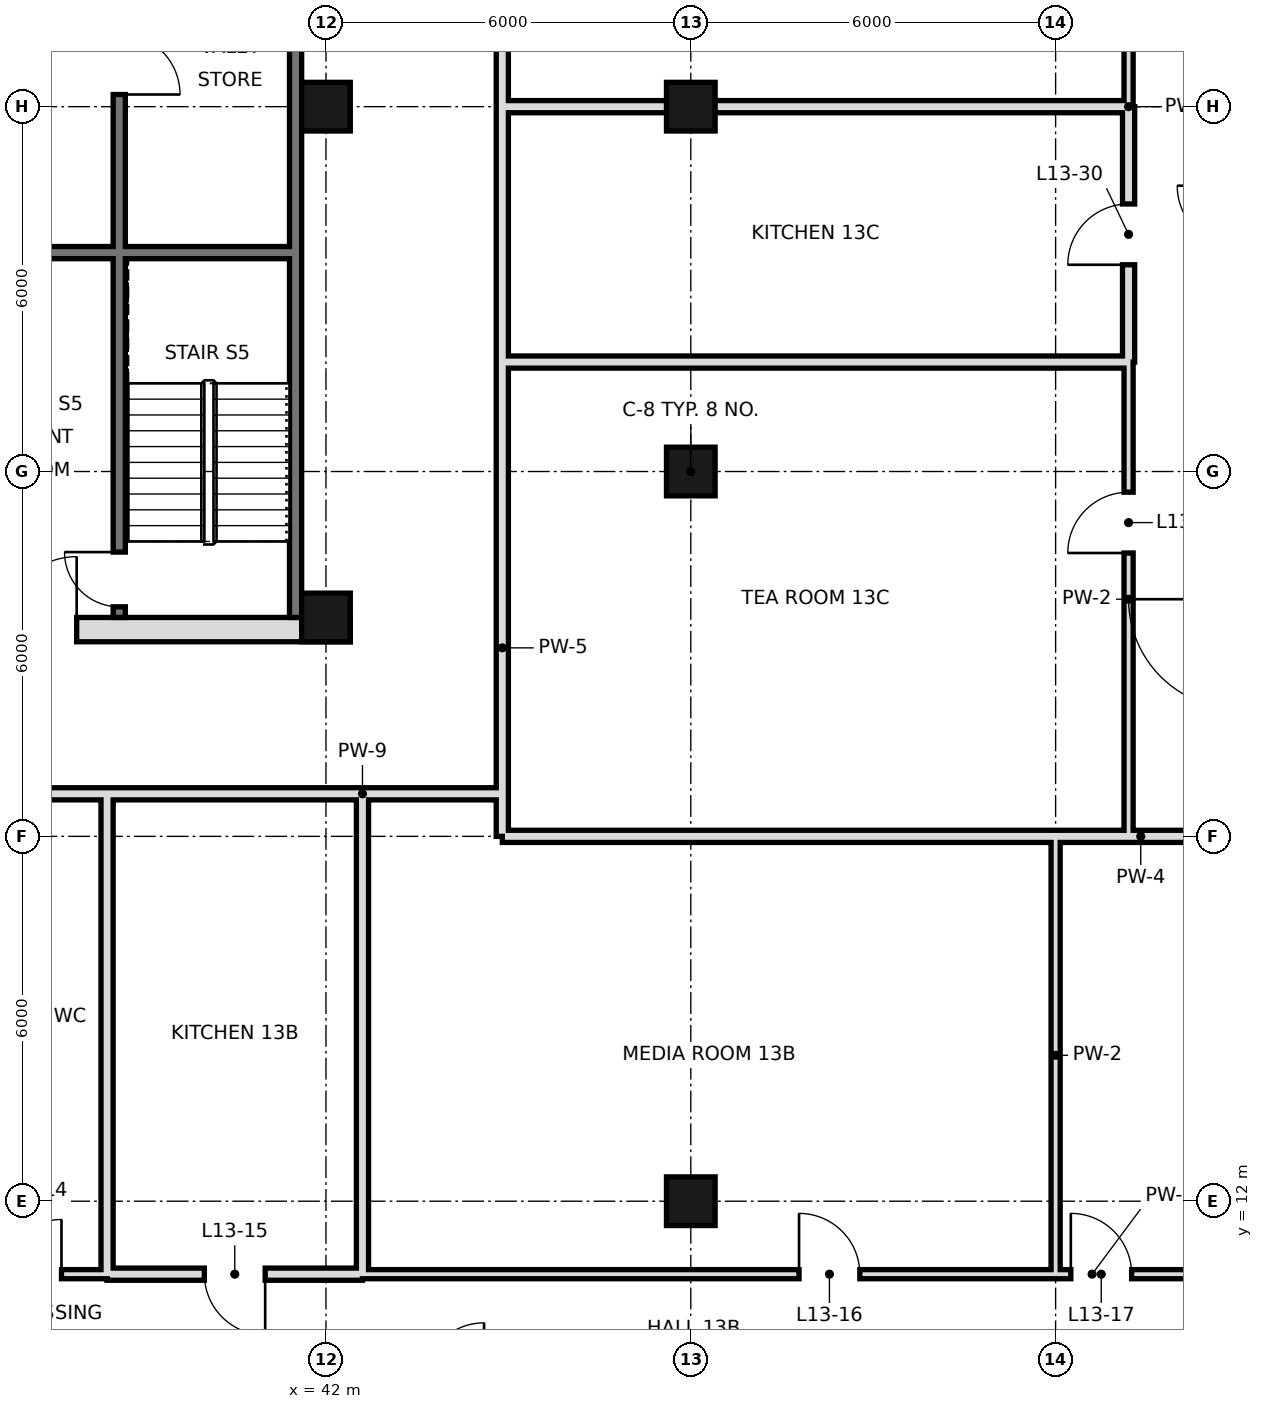
"""IFC4 building model, lengths in metres.
Left out: names, types, materials, properties, quantities, classifications, styles, units other than length and angle.
Written with IfcOpenShell. Run it as: python <this file> out.ifc"""

import sys

from ifc_helpers import new_model, si_unit, direction, frame, frame_2d, origin, origin_2d, place, context, subcontext, project, spatial, rectangle, hollow_rectangle, extrude, element, fill, save


model = new_model("IFC4")
c1 = context("Model", 3, precision=1e-05, world=origin(), true_north=direction((0.0, 1.0)))
c2 = subcontext(c1, "Body", "Model", "MODEL_VIEW")
j1 = project(units=[si_unit("LENGTHUNIT", "METRE"), si_unit("PLANEANGLEUNIT", "RADIAN")], contexts=[c1])
p1 = place(None, origin())
s1 = spatial("IfcSite", under=j1, at=p1, CompositionType="ELEMENT")
p2 = place(p1, origin())
s2 = spatial("IfcBuilding", under=s1, at=p2, CompositionType="ELEMENT")
p3 = place(p2, frame((0.0, 0.0, 67.8)))
s3 = spatial("IfcBuildingStorey", under=s2, at=p3, CompositionType="ELEMENT", Elevation=67.8)
for number, where, z_axis, x_axis in (
    (1, (42.0, 21.6, 0.0), (0.0, 0.0, 1.0), (1.0, 0.0, 0.0)),
    (2, (42.0, 30.0, 0.0), (0.0, 0.0, 1.0), (1.0, 0.0, 0.0)),
):
    element("IfcColumn", number, at=place(p3, frame(where, z_axis=z_axis, x_axis=x_axis)), inside=s3, PredefinedType="COLUMN", context=c2, shape_type="SweptSolid", body=[
        extrude(hollow_rectangle(XDim=0.8, YDim=0.8, WallThickness=0.06, at=origin_2d()), origin(), (0.0, 0.0, 1.0), 3.6),
    ])
for number, where, z_axis, x_axis in (
    (3, (48.0, 12.0, 0.0), (0.0, 0.0, 1.0), (1.0, 0.0, 0.0)),
    (4, (48.0, 24.0, 0.0), (0.0, 0.0, 1.0), (1.0, 0.0, 0.0)),
    (5, (48.0, 30.0, 0.0), (0.0, 0.0, 1.0), (1.0, 0.0, 0.0)),
):
    element("IfcColumn", number, at=place(p3, frame(where, z_axis=z_axis, x_axis=x_axis)), inside=s3, PredefinedType="COLUMN", context=c2, shape_type="SweptSolid", body=[
        extrude(hollow_rectangle(XDim=0.8, YDim=0.8, WallThickness=0.04, at=origin_2d()), origin(), (0.0, 0.0, 1.0), 3.6),
    ])
for number, where, z_axis, x_axis in (
    (6, (38.4, 10.8, 0.0), (0.0, 0.0, 1.0), (0.0, 1.0, 0.0)),
    (7, (42.6, 10.8, 0.0), (0.0, 0.0, 1.0), (0.0, 1.0, 0.0)),
):
    element("IfcWall", number, at=place(p3, frame(where, z_axis=z_axis, x_axis=x_axis)), inside=s3, PredefinedType="SOLIDWALL", context=c2, shape_type="SweptSolid", body=[
        extrude(rectangle(XDim=7.9, YDim=0.2, at=frame_2d((3.95, 0.0))), origin(), (0.0, 0.0, 1.0), 2.72),
    ])
p4 = place(p3, frame((44.9, 18.7, 0.0), z_axis=(0.0, 0.0, 1.0), x_axis=(0.0, 1.0, 0.0)))
e8 = element("IfcWall", 8, at=p4, inside=s3, PredefinedType="SOLIDWALL", context=c2, shape_type="SweptSolid", body=[
    extrude(rectangle(XDim=7.1, YDim=0.2, at=frame_2d((3.55, 0.0))), origin(), (0.0, 0.0, 1.0), 3.42),
])
p5 = place(p3, frame((44.9, 30.0, 0.0), z_axis=(0.0, 0.0, 1.0), x_axis=(0.0, 1.0, 0.0)))
e9 = element("IfcWall", 9, at=p5, inside=s3, PredefinedType="SOLIDWALL", context=c2, shape_type="SweptSolid", body=[
    extrude(rectangle(XDim=18.6, YDim=0.2, at=frame_2d((9.3, 0.0))), origin(), (0.0, 0.0, 1.0), 2.72),
])
p6 = place(p5, frame((12.6, 0.0, 0.0)))
e10 = element("IfcOpeningElement", 10, at=p6, cuts=e9, PredefinedType="OPENING", context=c2, shape_type="SweptSolid", body=[
    extrude(rectangle(XDim=1.2, YDim=2.4, at=frame_2d((0.6, 1.2))), frame((0.0, 0.11, 0.0), z_axis=(0.0, -1.0, 0.0), x_axis=(1.0, 0.0, 0.0)), (0.0, 0.0, 1.0), 0.22),
])
p7 = place(p3, frame((44.9, 25.8, 0.0), z_axis=(0.0, 0.0, 1.0), x_axis=(0.0, 1.0, 0.0)))
e11 = element("IfcWall", 11, at=p7, inside=s3, PredefinedType="SOLIDWALL", context=c2, shape_type="SweptSolid", body=[
    extrude(rectangle(XDim=4.2, YDim=0.2, at=frame_2d((2.1, 0.0))), origin(), (0.0, 0.0, 1.0), 2.97),
])
p8 = place(p3, frame((44.9, 18.0, 0.0), z_axis=(0.0, 0.0, 1.0), x_axis=(0.0, 1.0, 0.0)))
e12 = element("IfcWall", 12, at=p8, inside=s3, PredefinedType="SOLIDWALL", context=c2, shape_type="SweptSolid", body=[
    extrude(rectangle(XDim=0.7, YDim=0.2, at=frame_2d((0.35, 0.0))), origin(), (0.0, 0.0, 1.0), 2.97),
])
p9 = place(p3, frame((54.0, 10.8, 0.0), z_axis=(0.0, 0.0, 1.0), x_axis=(0.0, 1.0, 0.0)))
e13 = element("IfcWall", 13, at=p9, inside=s3, PredefinedType="PARTITIONING", context=c2, shape_type="SweptSolid", body=[
    extrude(rectangle(XDim=7.2, YDim=0.15, at=frame_2d((3.6, 0.0))), origin(), (0.0, 0.0, 1.0), 3.42),
])
p10 = place(p3, frame((55.2, 25.8, 0.0), z_axis=(0.0, 0.0, 1.0), x_axis=(0.0, 1.0, 0.0)))
e14 = element("IfcWall", 14, at=p10, inside=s3, PredefinedType="SOLIDWALL", context=c2, shape_type="SweptSolid", body=[
    extrude(rectangle(XDim=4.2, YDim=0.2, at=frame_2d((2.1, 0.0))), origin(), (0.0, 0.0, 1.0), 2.52),
])
p11 = place(p10, frame((1.6, 0.0, 0.0)))
e15 = element("IfcOpeningElement", 15, at=p11, cuts=e14, PredefinedType="OPENING", context=c2, shape_type="SweptSolid", body=[
    extrude(rectangle(XDim=1.0, YDim=2.4, at=frame_2d((0.5, 1.2))), frame((0.0, 0.11, 0.0), z_axis=(0.0, -1.0, 0.0), x_axis=(1.0, 0.0, 0.0)), (0.0, 0.0, 1.0), 0.22),
])
p12 = place(p3, frame((55.2, 18.0, 0.0), z_axis=(0.0, 0.0, 1.0), x_axis=(0.0, 1.0, 0.0)))
e16 = element("IfcWall", 16, at=p12, inside=s3, PredefinedType="PARTITIONING", context=c2, shape_type="SweptSolid", body=[
    extrude(rectangle(XDim=7.8, YDim=0.15, at=frame_2d((3.9, 0.0))), origin(), (0.0, 0.0, 1.0), 3.42),
])
p13 = place(p12, frame((4.66, 0.0, 0.0)))
e17 = element("IfcOpeningElement", 17, at=p13, cuts=e16, PredefinedType="OPENING", context=c2, shape_type="SweptSolid", body=[
    extrude(rectangle(XDim=1.0, YDim=2.4, at=frame_2d((0.5, 1.2))), frame((0.0, 0.085, 0.0), z_axis=(0.0, -1.0, 0.0), x_axis=(1.0, 0.0, 0.0)), (0.0, 0.0, 1.0), 0.17),
])
p14 = place(p3, frame((55.2, 30.0, 0.0), z_axis=(0.0, 0.0, 1.0), x_axis=(0.0, 1.0, 0.0)))
e18 = element("IfcWall", 18, at=p14, inside=s3, PredefinedType="PARTITIONING", context=c2, shape_type="SweptSolid", body=[
    extrude(rectangle(XDim=15.6, YDim=0.15, at=frame_2d((7.8, 0.0))), origin(), (0.0, 0.0, 1.0), 3.42),
])
p15 = place(p14, frame((12.7, 0.0, 0.0)))
e19 = element("IfcOpeningElement", 19, at=p15, cuts=e18, PredefinedType="OPENING", context=c2, shape_type="SweptSolid", body=[
    extrude(rectangle(XDim=1.0, YDim=2.4, at=frame_2d((0.5, 1.2))), frame((0.0, 0.085, 0.0), z_axis=(0.0, -1.0, 0.0), x_axis=(1.0, 0.0, 0.0)), (0.0, 0.0, 1.0), 0.17),
])
p16 = place(p14, frame((3.04, 0.0, 0.0)))
e20 = element("IfcOpeningElement", 20, at=p16, cuts=e18, PredefinedType="OPENING", context=c2, shape_type="SweptSolid", body=[
    extrude(rectangle(XDim=1.0, YDim=2.4, at=frame_2d((0.5, 1.2))), frame((0.0, 0.085, 0.0), z_axis=(0.0, -1.0, 0.0), x_axis=(1.0, 0.0, 0.0)), (0.0, 0.0, 1.0), 0.17),
])
p17 = place(p3, frame((38.4, 10.8, 0.0), z_axis=(0.0, 0.0, 1.0), x_axis=(1.0, 0.0, 0.0)))
e21 = element("IfcWall", 21, at=p17, inside=s3, PredefinedType="SOLIDWALL", context=c2, shape_type="SweptSolid", body=[
    extrude(rectangle(XDim=4.2, YDim=0.2, at=frame_2d((2.1, 0.0))), origin(), (0.0, 0.0, 1.0), 2.72),
])
p18 = place(p17, frame((1.6, 0.0, 0.0)))
e22 = element("IfcOpeningElement", 22, at=p18, cuts=e21, PredefinedType="OPENING", context=c2, shape_type="SweptSolid", body=[
    extrude(rectangle(XDim=1.0, YDim=2.4, at=frame_2d((0.5, 1.2))), frame((0.0, 0.11, 0.0), z_axis=(0.0, -1.0, 0.0), x_axis=(1.0, 0.0, 0.0)), (0.0, 0.0, 1.0), 0.22),
])
p19 = place(p3, frame((42.6, 10.8, 0.0), z_axis=(0.0, 0.0, 1.0), x_axis=(1.0, 0.0, 0.0)))
e23 = element("IfcWall", 23, at=p19, inside=s3, PredefinedType="PARTITIONING", context=c2, shape_type="SweptSolid", body=[
    extrude(rectangle(XDim=24.0, YDim=0.15, at=frame_2d((12.0, 0.0))), origin(), (0.0, 0.0, 1.0), 3.42),
])
p20 = place(p19, frame((7.18, 0.0, 0.0)))
e24 = element("IfcOpeningElement", 24, at=p20, cuts=e23, PredefinedType="OPENING", context=c2, shape_type="SweptSolid", body=[
    extrude(rectangle(XDim=1.0, YDim=2.4, at=frame_2d((0.5, 1.2))), frame((0.0, 0.085, 0.0), z_axis=(0.0, -1.0, 0.0), x_axis=(1.0, 0.0, 0.0)), (0.0, 0.0, 1.0), 0.17),
])
p21 = place(p19, frame((11.65, 0.0, 0.0)))
e25 = element("IfcOpeningElement", 25, at=p21, cuts=e23, PredefinedType="OPENING", context=c2, shape_type="SweptSolid", body=[
    extrude(rectangle(XDim=1.0, YDim=2.4, at=frame_2d((0.5, 1.2))), frame((0.0, 0.085, 0.0), z_axis=(0.0, -1.0, 0.0), x_axis=(1.0, 0.0, 0.0)), (0.0, 0.0, 1.0), 0.17),
])
p22 = place(p3, frame((36.0, 10.8, 0.0), z_axis=(0.0, 0.0, 1.0), x_axis=(1.0, 0.0, 0.0)))
e26 = element("IfcWall", 26, at=p22, inside=s3, PredefinedType="PARTITIONING", context=c2, shape_type="SweptSolid", body=[
    extrude(rectangle(XDim=2.4, YDim=0.15, at=frame_2d((1.2, 0.0))), origin(), (0.0, 0.0, 1.0), 3.42),
])
p23 = place(p22, frame((0.75, 0.0, 0.0)))
e27 = element("IfcOpeningElement", 27, at=p23, cuts=e26, PredefinedType="OPENING", context=c2, shape_type="SweptSolid", body=[
    extrude(rectangle(XDim=0.9, YDim=2.4, at=frame_2d((0.45, 1.2))), frame((0.0, 0.085, 0.0), z_axis=(0.0, -1.0, 0.0), x_axis=(1.0, 0.0, 0.0)), (0.0, 0.0, 1.0), 0.17),
])
p24 = place(p3, frame((44.9, 18.0, 0.0), z_axis=(0.0, 0.0, 1.0), x_axis=(1.0, 0.0, 0.0)))
e28 = element("IfcWall", 28, at=p24, inside=s3, PredefinedType="SOLIDWALL", context=c2, shape_type="SweptSolid", body=[
    extrude(rectangle(XDim=21.7, YDim=0.2, at=frame_2d((10.85, 0.0))), origin(), (0.0, 0.0, 1.0), 2.52),
])
p25 = place(p3, frame((26.4, 18.7, 0.0), z_axis=(0.0, 0.0, 1.0), x_axis=(1.0, 0.0, 0.0)))
e29 = element("IfcWall", 29, at=p25, inside=s3, PredefinedType="SOLIDWALL", context=c2, shape_type="SweptSolid", body=[
    extrude(rectangle(XDim=12.0, YDim=0.2, at=frame_2d((6.0, 0.0))), origin(), (0.0, 0.0, 1.0), 2.72),
])
p26 = place(p25, frame((1.58, 0.0, 0.0)))
e30 = element("IfcOpeningElement", 30, at=p26, cuts=e29, PredefinedType="OPENING", context=c2, shape_type="SweptSolid", body=[
    extrude(rectangle(XDim=1.2, YDim=2.4, at=frame_2d((0.6, 1.2))), frame((0.0, 0.11, 0.0), z_axis=(0.0, -1.0, 0.0), x_axis=(1.0, 0.0, 0.0)), (0.0, 0.0, 1.0), 0.22),
])
p27 = place(p25, frame((6.86, 0.0, 0.0)))
e31 = element("IfcOpeningElement", 31, at=p27, cuts=e29, PredefinedType="OPENING", context=c2, shape_type="SweptSolid", body=[
    extrude(rectangle(XDim=1.2, YDim=2.4, at=frame_2d((0.6, 1.2))), frame((0.0, 0.11, 0.0), z_axis=(0.0, -1.0, 0.0), x_axis=(1.0, 0.0, 0.0)), (0.0, 0.0, 1.0), 0.22),
])
p28 = place(p3, frame((42.6, 18.7, 0.0), z_axis=(0.0, 0.0, 1.0), x_axis=(1.0, 0.0, 0.0)))
e32 = element("IfcWall", 32, at=p28, inside=s3, PredefinedType="SOLIDWALL", context=c2, shape_type="SweptSolid", body=[
    extrude(rectangle(XDim=2.3, YDim=0.2, at=frame_2d((1.15, 0.0))), origin(), (0.0, 0.0, 1.0), 3.42),
])
p29 = place(p3, frame((38.4, 18.7, 0.0), z_axis=(0.0, 0.0, 1.0), x_axis=(1.0, 0.0, 0.0)))
e33 = element("IfcWall", 33, at=p29, inside=s3, PredefinedType="SOLIDWALL", context=c2, shape_type="SweptSolid", body=[
    extrude(rectangle(XDim=4.2, YDim=0.2, at=frame_2d((2.1, 0.0))), origin(), (0.0, 0.0, 1.0), 2.72),
])
p30 = place(p3, frame((44.9, 25.8, 0.0), z_axis=(0.0, 0.0, 1.0), x_axis=(1.0, 0.0, 0.0)))
e34 = element("IfcWall", 34, at=p30, inside=s3, PredefinedType="SOLIDWALL", context=c2, shape_type="SweptSolid", body=[
    extrude(rectangle(XDim=10.3, YDim=0.2, at=frame_2d((5.15, 0.0))), origin(), (0.0, 0.0, 1.0), 2.97),
])
p31 = place(p3, frame((44.9, 30.0, 0.0), z_axis=(0.0, 0.0, 1.0), x_axis=(1.0, 0.0, 0.0)))
e35 = element("IfcWall", 35, at=p31, inside=s3, PredefinedType="SOLIDWALL", context=c2, shape_type="SweptSolid", body=[
    extrude(rectangle(XDim=10.3, YDim=0.2, at=frame_2d((5.15, 0.0))), origin(), (0.0, 0.0, 1.0), 2.52),
])
p32 = place(p3, frame((41.5, 21.6, 0.0), z_axis=(0.0, 0.0, 1.0), x_axis=(0.0, 1.0, 0.0)))
e36 = element("IfcWall", 36, at=p32, inside=s3, PredefinedType="SOLIDWALL", context=c2, shape_type="SweptSolid", body=[
    extrude(rectangle(XDim=23.5, YDim=0.2, at=frame_2d((11.75, 0.0))), origin(), (0.0, 0.0, 1.0), 3.42),
])
p33 = place(p3, frame((5.6, 21.4, 0.0), z_axis=(0.0, 0.0, 1.0), x_axis=(1.0, 0.0, 0.0)))
e37 = element("IfcWall", 37, at=p33, inside=s3, PredefinedType="SOLIDWALL", context=c2, shape_type="SweptSolid", body=[
    extrude(rectangle(XDim=36.8, YDim=0.4, at=frame_2d((18.4, 0.0))), origin(), (0.0, 0.0, 1.0), 3.42),
])
p34 = place(p33, frame((8.5, 0.0, 0.0)))
e38 = element("IfcOpeningElement", 38, at=p34, cuts=e37, PredefinedType="OPENING", context=c2, shape_type="SweptSolid", body=[
    extrude(rectangle(XDim=1.8, YDim=2.1, at=frame_2d((0.9, 1.05))), frame((0.0, 0.21, 0.0), z_axis=(0.0, -1.0, 0.0), x_axis=(1.0, 0.0, 0.0)), (0.0, 0.0, 1.0), 0.42),
])
p35 = place(p33, frame((17.5, 0.0, 0.0)))
e39 = element("IfcOpeningElement", 39, at=p35, cuts=e37, PredefinedType="OPENING", context=c2, shape_type="SweptSolid", body=[
    extrude(rectangle(XDim=1.8, YDim=2.1, at=frame_2d((0.9, 1.05))), frame((0.0, 0.21, 0.0), z_axis=(0.0, -1.0, 0.0), x_axis=(1.0, 0.0, 0.0)), (0.0, 0.0, 1.0), 0.42),
])
p36 = place(p33, frame((26.5, 0.0, 0.0)))
e40 = element("IfcOpeningElement", 40, at=p36, cuts=e37, PredefinedType="OPENING", context=c2, shape_type="SweptSolid", body=[
    extrude(rectangle(XDim=1.8, YDim=2.1, at=frame_2d((0.9, 1.05))), frame((0.0, 0.21, 0.0), z_axis=(0.0, -1.0, 0.0), x_axis=(1.0, 0.0, 0.0)), (0.0, 0.0, 1.0), 0.42),
])
p37 = place(p33, frame((4.5, 0.0, 0.0)))
e41 = element("IfcOpeningElement", 41, at=p37, cuts=e37, PredefinedType="OPENING", context=c2, shape_type="SweptSolid", body=[
    extrude(rectangle(XDim=1.2, YDim=2.1, at=frame_2d((0.6, 1.05))), frame((0.0, 0.21, 0.0), z_axis=(0.0, -1.0, 0.0), x_axis=(1.0, 0.0, 0.0)), (0.0, 0.0, 1.0), 0.42),
])
p38 = place(p33, frame((31.1, 0.0, 0.0)))
e42 = element("IfcOpeningElement", 42, at=p38, cuts=e37, PredefinedType="OPENING", context=c2, shape_type="SweptSolid", body=[
    extrude(rectangle(XDim=1.2, YDim=2.1, at=frame_2d((0.6, 1.05))), frame((0.0, 0.21, 0.0), z_axis=(0.0, -1.0, 0.0), x_axis=(1.0, 0.0, 0.0)), (0.0, 0.0, 1.0), 0.42),
])
p39 = place(p3, frame((38.6, 21.6, 0.0), z_axis=(0.0, 0.0, 1.0), x_axis=(0.0, 1.0, 0.0)))
e43 = element("IfcWall", 43, at=p39, inside=s3, PredefinedType="SOLIDWALL", context=c2, shape_type="SweptSolid", body=[
    extrude(rectangle(XDim=23.4, YDim=0.2, at=frame_2d((11.7, 0.0))), origin(), (0.0, 0.0, 1.0), 3.42),
])
p40 = place(p39, frame((8.6, 0.0, 0.0)))
e44 = element("IfcOpeningElement", 44, at=p40, cuts=e43, PredefinedType="OPENING", context=c2, shape_type="SweptSolid", body=[
    extrude(rectangle(XDim=1.0, YDim=2.1, at=frame_2d((0.5, 1.05))), frame((0.0, 0.11, 0.0), z_axis=(0.0, -1.0, 0.0), x_axis=(1.0, 0.0, 0.0)), (0.0, 0.0, 1.0), 0.22),
])
p41 = place(p39, frame((13.25, 0.0, 0.0)))
e45 = element("IfcOpeningElement", 45, at=p41, cuts=e43, PredefinedType="OPENING", context=c2, shape_type="SweptSolid", body=[
    extrude(rectangle(XDim=1.0, YDim=2.1, at=frame_2d((0.5, 1.05))), frame((0.0, 0.11, 0.0), z_axis=(0.0, -1.0, 0.0), x_axis=(1.0, 0.0, 0.0)), (0.0, 0.0, 1.0), 0.22),
])
p42 = place(p39, frame((15.7, 0.0, 0.0)))
e46 = element("IfcOpeningElement", 46, at=p42, cuts=e43, PredefinedType="OPENING", context=c2, shape_type="SweptSolid", body=[
    extrude(rectangle(XDim=1.0, YDim=2.1, at=frame_2d((0.5, 1.05))), frame((0.0, 0.11, 0.0), z_axis=(0.0, -1.0, 0.0), x_axis=(1.0, 0.0, 0.0)), (0.0, 0.0, 1.0), 0.22),
])
p43 = place(p39, frame((0.175, 0.0, 0.0)))
e47 = element("IfcOpeningElement", 47, at=p43, cuts=e43, PredefinedType="OPENING", context=c2, shape_type="SweptSolid", body=[
    extrude(rectangle(XDim=0.9, YDim=2.1, at=frame_2d((0.45, 1.05))), frame((0.0, 0.11, 0.0), z_axis=(0.0, -1.0, 0.0), x_axis=(1.0, 0.0, 0.0)), (0.0, 0.0, 1.0), 0.22),
])
p44 = place(p3, frame((36.1, 27.6, 0.0), z_axis=(0.0, 0.0, 1.0), x_axis=(1.0, 0.0, 0.0)))
e48 = element("IfcWall", 48, at=p44, inside=s3, PredefinedType="SOLIDWALL", context=c2, shape_type="SweptSolid", body=[
    extrude(rectangle(XDim=5.3, YDim=0.2, at=frame_2d((2.65, 0.0))), origin(), (0.0, 0.0, 1.0), 3.42),
])
p45 = place(p23, frame((0.9, 0.0, 0.0), z_axis=(0.0, 0.0, 1.0), x_axis=(-1.0, 0.0, 0.0)))
e49 = element("IfcDoor", 49, at=p45, inside=s3, OperationType="SINGLE_SWING_LEFT", PredefinedType="DOOR", context=c2, shape_type="SweptSolid", body=[
    extrude(rectangle(XDim=0.9, YDim=2.4, at=frame_2d((0.45, 1.2))), frame((0.0, 0.025, 0.0), z_axis=(0.0, -1.0, 0.0), x_axis=(1.0, 0.0, 0.0)), (0.0, 0.0, 1.0), 0.05),
])
fill(e27, e49)
p46 = place(p18, origin())
e50 = element("IfcDoor", 50, at=p46, inside=s3, OperationType="SINGLE_SWING_RIGHT", PredefinedType="DOOR", context=c2, shape_type="SweptSolid", body=[
    extrude(rectangle(XDim=1.0, YDim=2.4, at=frame_2d((0.5, 1.2))), frame((0.0, 0.025, 0.0), z_axis=(0.0, -1.0, 0.0), x_axis=(1.0, 0.0, 0.0)), (0.0, 0.0, 1.0), 0.05),
])
fill(e22, e50)
p47 = place(p20, origin())
e51 = element("IfcDoor", 51, at=p47, inside=s3, OperationType="SINGLE_SWING_LEFT", PredefinedType="DOOR", context=c2, shape_type="SweptSolid", body=[
    extrude(rectangle(XDim=1.0, YDim=2.4, at=frame_2d((0.5, 1.2))), frame((0.0, 0.025, 0.0), z_axis=(0.0, -1.0, 0.0), x_axis=(1.0, 0.0, 0.0)), (0.0, 0.0, 1.0), 0.05),
])
fill(e24, e51)
p48 = place(p21, origin())
e52 = element("IfcDoor", 52, at=p48, inside=s3, OperationType="SINGLE_SWING_LEFT", PredefinedType="DOOR", context=c2, shape_type="SweptSolid", body=[
    extrude(rectangle(XDim=1.0, YDim=2.4, at=frame_2d((0.5, 1.2))), frame((0.0, 0.025, 0.0), z_axis=(0.0, -1.0, 0.0), x_axis=(1.0, 0.0, 0.0)), (0.0, 0.0, 1.0), 0.05),
])
fill(e25, e52)
p49 = place(p13, origin())
e53 = element("IfcDoor", 53, at=p49, inside=s3, OperationType="SINGLE_SWING_LEFT", PredefinedType="DOOR", context=c2, shape_type="SweptSolid", body=[
    extrude(rectangle(XDim=1.0, YDim=2.4, at=frame_2d((0.5, 1.2))), frame((0.0, 0.025, 0.0), z_axis=(0.0, -1.0, 0.0), x_axis=(1.0, 0.0, 0.0)), (0.0, 0.0, 1.0), 0.05),
])
fill(e17, e53)
p50 = place(p11, origin())
e54 = element("IfcDoor", 54, at=p50, inside=s3, OperationType="SINGLE_SWING_LEFT", PredefinedType="DOOR", context=c2, shape_type="SweptSolid", body=[
    extrude(rectangle(XDim=1.0, YDim=2.4, at=frame_2d((0.5, 1.2))), frame((0.0, 0.025, 0.0), z_axis=(0.0, -1.0, 0.0), x_axis=(1.0, 0.0, 0.0)), (0.0, 0.0, 1.0), 0.05),
])
fill(e15, e54)
p51 = place(p38, frame((1.2, 0.0, 0.0), z_axis=(0.0, 0.0, 1.0), x_axis=(-1.0, 0.0, 0.0)))
e55 = element("IfcDoor", 55, at=p51, inside=s3, OperationType="SINGLE_SWING_LEFT", PredefinedType="DOOR", context=c2, shape_type="SweptSolid", body=[
    extrude(rectangle(XDim=1.2, YDim=2.1, at=frame_2d((0.6, 1.05))), frame((0.0, 0.025, 0.0), z_axis=(0.0, -1.0, 0.0), x_axis=(1.0, 0.0, 0.0)), (0.0, 0.0, 1.0), 0.05),
])
fill(e42, e55)
p52 = place(p40, frame((1.0, 0.0, 0.0), z_axis=(0.0, 0.0, 1.0), x_axis=(-1.0, 0.0, 0.0)))
e56 = element("IfcDoor", 56, at=p52, inside=s3, OperationType="SINGLE_SWING_RIGHT", PredefinedType="DOOR", context=c2, shape_type="SweptSolid", body=[
    extrude(rectangle(XDim=1.0, YDim=2.1, at=frame_2d((0.5, 1.05))), frame((0.0, 0.025, 0.0), z_axis=(0.0, -1.0, 0.0), x_axis=(1.0, 0.0, 0.0)), (0.0, 0.0, 1.0), 0.05),
])
fill(e44, e56)
p53 = place(p43, frame((0.9, 0.0, 0.0), z_axis=(0.0, 0.0, 1.0), x_axis=(-1.0, 0.0, 0.0)))
e57 = element("IfcDoor", 57, at=p53, inside=s3, OperationType="SINGLE_SWING_LEFT", PredefinedType="DOOR", context=c2, shape_type="SweptSolid", body=[
    extrude(rectangle(XDim=0.9, YDim=2.1, at=frame_2d((0.45, 1.05))), frame((0.0, 0.025, 0.0), z_axis=(0.0, -1.0, 0.0), x_axis=(1.0, 0.0, 0.0)), (0.0, 0.0, 1.0), 0.05),
])
fill(e47, e57)
save(model, sys.argv[1])
